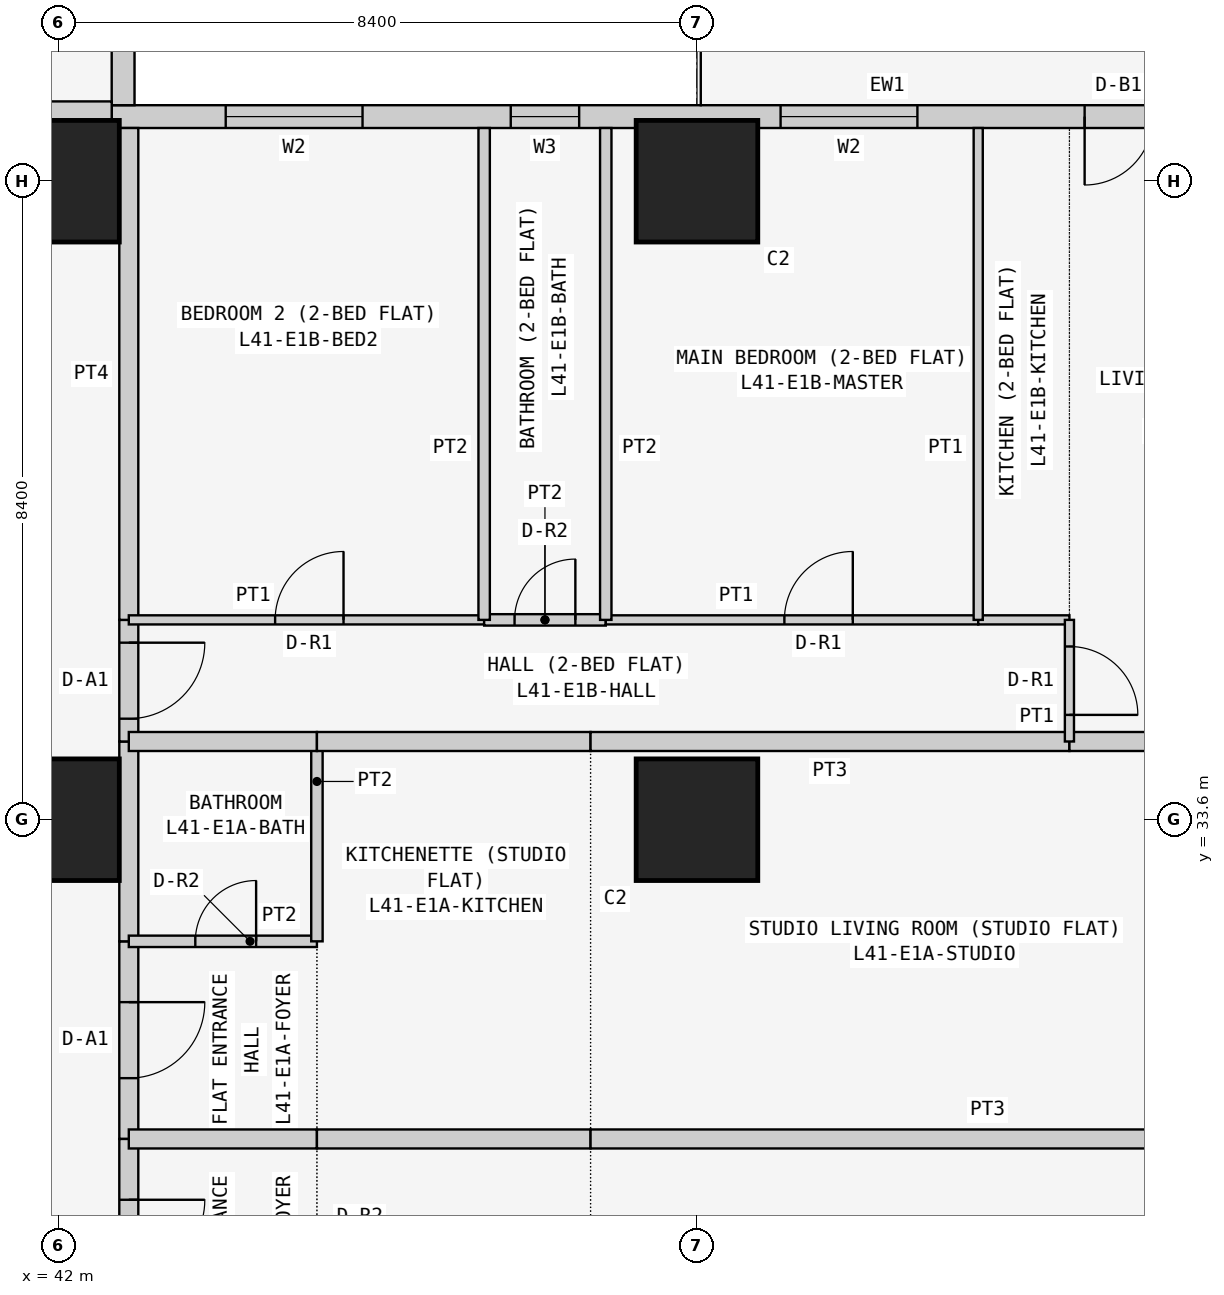
"""IFC4 building model, lengths in metres.
Left out: names, types, materials, properties, quantities, classifications, styles, units other than length and angle.
Written with IfcOpenShell. Run it as: python <this file> out.ifc"""

import sys

from ifc_helpers import new_model, si_unit, direction, frame, frame_2d, origin, origin_2d, place, context, subcontext, project, spatial, rectangle, extrude, element, fill, save


model = new_model("IFC4")
c1 = context("Model", 3, precision=1e-05, world=origin(), true_north=direction((0.0, 1.0)))
c2 = subcontext(c1, "Body", "Model", "MODEL_VIEW")
j1 = project(units=[si_unit("LENGTHUNIT", "METRE"), si_unit("PLANEANGLEUNIT", "RADIAN")], contexts=[c1])
p1 = place(None, origin())
s1 = spatial("IfcSite", under=j1, at=p1, CompositionType="ELEMENT")
p2 = place(p1, origin())
s2 = spatial("IfcBuilding", under=s1, at=p2, CompositionType="ELEMENT")
p3 = place(p2, frame((0.0, 0.0, 159.3)))
s3 = spatial("IfcBuildingStorey", under=s2, at=p3, CompositionType="ELEMENT", Elevation=159.3)
for number, where, z_axis, x_axis in (
    (1, (42.0, 33.6, 0.0), (0.0, 0.0, 1.0), (1.0, 0.0, 0.0)),
    (2, (42.0, 42.0, 0.0), (0.0, 0.0, 1.0), (1.0, 0.0, 0.0)),
    (3, (50.4, 33.6, 0.0), (0.0, 0.0, 1.0), (1.0, 0.0, 0.0)),
    (4, (50.4, 42.0, 0.0), (0.0, 0.0, 1.0), (1.0, 0.0, 0.0)),
):
    element("IfcColumn", number, at=place(p3, frame(where, z_axis=z_axis, x_axis=x_axis)), inside=s3, PredefinedType="COLUMN", context=c2, shape_type="SweptSolid", body=[
        extrude(rectangle(XDim=1.6, YDim=1.6, at=origin_2d()), origin(), (0.0, 0.0, 1.0), 3.6),
    ])
p4 = place(p3, frame((58.4, 42.85, 0.0), z_axis=(0.0, 0.0, 1.0), x_axis=(-1.0, 0.0, 0.0)))
e5 = element("IfcWall", 5, at=p4, inside=s3, PredefinedType="SOLIDWALL", context=c2, shape_type="SweptSolid", body=[
    extrude(rectangle(XDim=15.7, YDim=0.3, at=frame_2d((7.85, 0.0))), origin(), (0.0, 0.0, 1.0), 3.45),
])
p5 = place(p4, frame((12.4, 0.0, 0.9)))
e6 = element("IfcOpeningElement", 6, at=p5, cuts=e5, PredefinedType="OPENING", context=c2, shape_type="SweptSolid", body=[
    extrude(rectangle(XDim=1.8, YDim=1.5, at=frame_2d((0.9, 0.75))), frame((0.0, 0.16, 0.0), z_axis=(0.0, -1.0, 0.0), x_axis=(1.0, 0.0, 0.0)), (0.0, 0.0, 1.0), 0.32),
])
p6 = place(p4, frame((9.55, 0.0, 1.5)))
e7 = element("IfcOpeningElement", 7, at=p6, cuts=e5, PredefinedType="OPENING", context=c2, shape_type="SweptSolid", body=[
    extrude(rectangle(XDim=0.9, YDim=0.7, at=frame_2d((0.45, 0.35))), frame((0.0, 0.16, 0.0), z_axis=(0.0, -1.0, 0.0), x_axis=(1.0, 0.0, 0.0)), (0.0, 0.0, 1.0), 0.32),
])
p7 = place(p4, frame((5.1, 0.0, 0.9)))
e8 = element("IfcOpeningElement", 8, at=p7, cuts=e5, PredefinedType="OPENING", context=c2, shape_type="SweptSolid", body=[
    extrude(rectangle(XDim=1.8, YDim=1.5, at=frame_2d((0.9, 0.75))), frame((0.0, 0.16, 0.0), z_axis=(0.0, -1.0, 0.0), x_axis=(1.0, 0.0, 0.0)), (0.0, 0.0, 1.0), 0.32),
])
p8 = place(p4, frame((2.0, 0.0, 0.0)))
e9 = element("IfcOpeningElement", 9, at=p8, cuts=e5, PredefinedType="OPENING", context=c2, shape_type="SweptSolid", body=[
    extrude(rectangle(XDim=0.9, YDim=2.4, at=frame_2d((0.45, 1.2))), frame((0.0, 0.16, 0.0), z_axis=(0.0, -1.0, 0.0), x_axis=(1.0, 0.0, 0.0)), (0.0, 0.0, 1.0), 0.32),
])
p9 = place(p4, frame((0.7, 0.0, 0.9)))
e10 = element("IfcOpeningElement", 10, at=p9, cuts=e5, PredefinedType="OPENING", context=c2, shape_type="SweptSolid", body=[
    extrude(rectangle(XDim=1.2, YDim=1.5, at=frame_2d((0.6, 0.75))), frame((0.0, 0.16, 0.0), z_axis=(0.0, -1.0, 0.0), x_axis=(1.0, 0.0, 0.0)), (0.0, 0.0, 1.0), 0.32),
])
p10 = place(p3, frame((42.85, 43.0, 0.0), z_axis=(0.0, 0.0, 1.0), x_axis=(0.0, 1.0, 0.0)))
e11 = element("IfcWall", 11, at=p10, inside=s3, PredefinedType="SOLIDWALL", context=c2, shape_type="SweptSolid", body=[
    extrude(rectangle(XDim=7.0, YDim=0.3, at=frame_2d((3.5, 0.0))), origin(), (0.0, 0.0, 1.0), 3.45),
])
p11 = place(p10, frame((1.5, 0.0, 0.9)))
e12 = element("IfcOpeningElement", 12, at=p11, cuts=e11, PredefinedType="OPENING", context=c2, shape_type="SweptSolid", body=[
    extrude(rectangle(XDim=2.4, YDim=1.5, at=frame_2d((1.2, 0.75))), frame((0.0, 0.16, 0.0), z_axis=(0.0, -1.0, 0.0), x_axis=(1.0, 0.0, 0.0)), (0.0, 0.0, 1.0), 0.32),
])
p12 = place(p10, frame((5.05, 0.0, 0.9)))
e13 = element("IfcOpeningElement", 13, at=p12, cuts=e11, PredefinedType="OPENING", context=c2, shape_type="SweptSolid", body=[
    extrude(rectangle(XDim=1.2, YDim=1.5, at=frame_2d((0.6, 0.75))), frame((0.0, 0.16, 0.0), z_axis=(0.0, -1.0, 0.0), x_axis=(1.0, 0.0, 0.0)), (0.0, 0.0, 1.0), 0.32),
])
p13 = place(p3, frame((35.829, 42.925, 0.0), z_axis=(0.0, 0.0, 1.0), x_axis=(1.0, 0.0, 0.0)))
e14 = element("IfcWall", 14, at=p13, inside=s3, PredefinedType="PARTITIONING", context=c2, shape_type="SweptSolid", body=[
    extrude(rectangle(XDim=6.871, YDim=0.25, at=frame_2d((3.436, 0.0))), origin(), (0.0, 0.0, 1.0), 3.45),
])
p14 = place(p3, frame((42.925, 32.0, 0.0), z_axis=(0.0, 0.0, 1.0), x_axis=(0.0, -1.0, 0.0)))
e15 = element("IfcWall", 15, at=p14, inside=s3, PredefinedType="PARTITIONING", context=c2, shape_type="SweptSolid", body=[
    extrude(rectangle(XDim=2.6, YDim=0.25, at=frame_2d((1.3, 0.0))), origin(), (0.0, 0.0, 1.0), 3.45),
])
p15 = place(p14, frame((0.8, 0.0, 0.0)))
e16 = element("IfcOpeningElement", 16, at=p15, cuts=e15, PredefinedType="OPENING", context=c2, shape_type="SweptSolid", body=[
    extrude(rectangle(XDim=1.0, YDim=2.1, at=frame_2d((0.5, 1.05))), frame((0.0, 0.135, 0.0), z_axis=(0.0, -1.0, 0.0), x_axis=(1.0, 0.0, 0.0)), (0.0, 0.0, 1.0), 0.27),
])
p16 = place(p3, frame((42.925, 34.629, 0.0), z_axis=(0.0, 0.0, 1.0), x_axis=(0.0, -1.0, 0.0)))
e17 = element("IfcWall", 17, at=p16, inside=s3, PredefinedType="PARTITIONING", context=c2, shape_type="SweptSolid", body=[
    extrude(rectangle(XDim=2.629, YDim=0.25, at=frame_2d((1.314, 0.0))), origin(), (0.0, 0.0, 1.0), 3.45),
])
p17 = place(p3, frame((42.925, 36.229, 0.0), z_axis=(0.0, 0.0, 1.0), x_axis=(0.0, -1.0, 0.0)))
e18 = element("IfcWall", 18, at=p17, inside=s3, PredefinedType="PARTITIONING", context=c2, shape_type="SweptSolid", body=[
    extrude(rectangle(XDim=1.6, YDim=0.25, at=frame_2d((0.8, 0.0))), origin(), (0.0, 0.0, 1.0), 3.45),
])
p18 = place(p17, frame((0.3, 0.0, 0.0)))
e19 = element("IfcOpeningElement", 19, at=p18, cuts=e18, PredefinedType="OPENING", context=c2, shape_type="SweptSolid", body=[
    extrude(rectangle(XDim=1.0, YDim=2.1, at=frame_2d((0.5, 1.05))), frame((0.0, 0.135, 0.0), z_axis=(0.0, -1.0, 0.0), x_axis=(1.0, 0.0, 0.0)), (0.0, 0.0, 1.0), 0.27),
])
p19 = place(p3, frame((42.925, 42.7, 0.0), z_axis=(0.0, 0.0, 1.0), x_axis=(0.0, -1.0, 0.0)))
e20 = element("IfcWall", 20, at=p19, inside=s3, PredefinedType="PARTITIONING", context=c2, shape_type="SweptSolid", body=[
    extrude(rectangle(XDim=6.471, YDim=0.25, at=frame_2d((3.235, 0.0))), origin(), (0.0, 0.0, 1.0), 3.45),
])
p20 = place(p3, frame((42.925, 29.4, 0.0), z_axis=(0.0, 0.0, 1.0), x_axis=(0.0, -1.0, 0.0)))
e21 = element("IfcWall", 21, at=p20, inside=s3, PredefinedType="PARTITIONING", context=c2, shape_type="SweptSolid", body=[
    extrude(rectangle(XDim=2.6, YDim=0.25, at=frame_2d((1.3, 0.0))), origin(), (0.0, 0.0, 1.0), 3.45),
])
p21 = place(p20, frame((0.8, 0.0, 0.0)))
e22 = element("IfcOpeningElement", 22, at=p21, cuts=e21, PredefinedType="OPENING", context=c2, shape_type="SweptSolid", body=[
    extrude(rectangle(XDim=1.0, YDim=2.1, at=frame_2d((0.5, 1.05))), frame((0.0, 0.135, 0.0), z_axis=(0.0, -1.0, 0.0), x_axis=(1.0, 0.0, 0.0)), (0.0, 0.0, 1.0), 0.27),
])
p22 = place(p3, frame((45.4, 32.0, 0.0), z_axis=(0.0, 0.0, 1.0), x_axis=(-1.0, 0.0, 0.0)))
e23 = element("IfcWall", 23, at=p22, inside=s3, PredefinedType="PARTITIONING", context=c2, shape_type="SweptSolid", body=[
    extrude(rectangle(XDim=2.475, YDim=0.15, at=frame_2d((1.237, 0.0))), origin(), (0.0, 0.0, 1.0), 3.45),
])
p23 = place(p22, frame((0.8, 0.0, 0.0)))
e24 = element("IfcOpeningElement", 24, at=p23, cuts=e23, PredefinedType="OPENING", context=c2, shape_type="SweptSolid", body=[
    extrude(rectangle(XDim=0.8, YDim=2.1, at=frame_2d((0.4, 1.05))), frame((0.0, 0.085, 0.0), z_axis=(0.0, -1.0, 0.0), x_axis=(1.0, 0.0, 0.0)), (0.0, 0.0, 1.0), 0.17),
])
p24 = place(p3, frame((42.925, 29.4, 0.0), z_axis=(0.0, 0.0, 1.0), x_axis=(1.0, 0.0, 0.0)))
e25 = element("IfcWall", 25, at=p24, inside=s3, PredefinedType="PARTITIONING", context=c2, shape_type="SweptSolid", body=[
    extrude(rectangle(XDim=2.475, YDim=0.25, at=frame_2d((1.237, 0.0))), origin(), (0.0, 0.0, 1.0), 3.45),
])
p25 = place(p3, frame((45.4, 32.0, 0.0), z_axis=(0.0, 0.0, 1.0), x_axis=(0.0, 1.0, 0.0)))
e26 = element("IfcWall", 26, at=p25, inside=s3, PredefinedType="PARTITIONING", context=c2, shape_type="SweptSolid", body=[
    extrude(rectangle(XDim=2.629, YDim=0.15, at=frame_2d((1.314, 0.0))), origin(), (0.0, 0.0, 1.0), 3.45),
])
p26 = place(p3, frame((45.4, 34.629, 0.0), z_axis=(0.0, 0.0, 1.0), x_axis=(-1.0, 0.0, 0.0)))
e27 = element("IfcWall", 27, at=p26, inside=s3, PredefinedType="PARTITIONING", context=c2, shape_type="SweptSolid", body=[
    extrude(rectangle(XDim=2.475, YDim=0.25, at=frame_2d((1.237, 0.0))), origin(), (0.0, 0.0, 1.0), 3.45),
])
for number, where, z_axis, x_axis in (
    (28, (49.0, 34.629, 0.0), (0.0, 0.0, 1.0), (-1.0, 0.0, 0.0)),
    (29, (45.4, 29.4, 0.0), (0.0, 0.0, 1.0), (1.0, 0.0, 0.0)),
):
    element("IfcWall", number, at=place(p3, frame(where, z_axis=z_axis, x_axis=x_axis)), inside=s3, PredefinedType="PARTITIONING", context=c2, shape_type="SweptSolid", body=[
        extrude(rectangle(XDim=3.6, YDim=0.25, at=frame_2d((1.8, 0.0))), origin(), (0.0, 0.0, 1.0), 3.45),
    ])
p27 = place(p3, frame((55.3, 34.629, 0.0), z_axis=(0.0, 0.0, 1.0), x_axis=(-1.0, 0.0, 0.0)))
e30 = element("IfcWall", 30, at=p27, inside=s3, PredefinedType="PARTITIONING", context=c2, shape_type="SweptSolid", body=[
    extrude(rectangle(XDim=6.3, YDim=0.25, at=frame_2d((3.15, 0.0))), origin(), (0.0, 0.0, 1.0), 3.45),
])
p28 = place(p3, frame((59.45, 34.629, 0.0), z_axis=(0.0, 0.0, 1.0), x_axis=(-1.0, 0.0, 0.0)))
e31 = element("IfcWall", 31, at=p28, inside=s3, PredefinedType="PARTITIONING", context=c2, shape_type="SweptSolid", body=[
    extrude(rectangle(XDim=4.15, YDim=0.25, at=frame_2d((2.075, 0.0))), origin(), (0.0, 0.0, 1.0), 3.45),
])
p29 = place(p3, frame((49.0, 29.4, 0.0), z_axis=(0.0, 0.0, 1.0), x_axis=(1.0, 0.0, 0.0)))
e32 = element("IfcWall", 32, at=p29, inside=s3, PredefinedType="PARTITIONING", context=c2, shape_type="SweptSolid", body=[
    extrude(rectangle(XDim=10.45, YDim=0.25, at=frame_2d((5.225, 0.0))), origin(), (0.0, 0.0, 1.0), 3.45),
])
p30 = place(p3, frame((47.6, 36.229, 0.0), z_axis=(0.0, 0.0, 1.0), x_axis=(-1.0, 0.0, 0.0)))
e33 = element("IfcWall", 33, at=p30, inside=s3, PredefinedType="PARTITIONING", context=c2, shape_type="SweptSolid", body=[
    extrude(rectangle(XDim=4.675, YDim=0.12, at=frame_2d((2.337, 0.0))), origin(), (0.0, 0.0, 1.0), 3.45),
])
p31 = place(p30, frame((1.85, 0.0, 0.0)))
e34 = element("IfcOpeningElement", 34, at=p31, cuts=e33, PredefinedType="OPENING", context=c2, shape_type="SweptSolid", body=[
    extrude(rectangle(XDim=0.9, YDim=2.1, at=frame_2d((0.45, 1.05))), frame((0.0, 0.07, 0.0), z_axis=(0.0, -1.0, 0.0), x_axis=(1.0, 0.0, 0.0)), (0.0, 0.0, 1.0), 0.14),
])
p32 = place(p3, frame((49.2, 36.229, 0.0), z_axis=(0.0, 0.0, 1.0), x_axis=(-1.0, 0.0, 0.0)))
e35 = element("IfcWall", 35, at=p32, inside=s3, PredefinedType="PARTITIONING", context=c2, shape_type="SweptSolid", body=[
    extrude(rectangle(XDim=1.6, YDim=0.15, at=frame_2d((0.8, 0.0))), origin(), (0.0, 0.0, 1.0), 3.45),
])
p33 = place(p32, frame((0.4, 0.0, 0.0)))
e36 = element("IfcOpeningElement", 36, at=p33, cuts=e35, PredefinedType="OPENING", context=c2, shape_type="SweptSolid", body=[
    extrude(rectangle(XDim=0.8, YDim=2.1, at=frame_2d((0.4, 1.05))), frame((0.0, 0.085, 0.0), z_axis=(0.0, -1.0, 0.0), x_axis=(1.0, 0.0, 0.0)), (0.0, 0.0, 1.0), 0.17),
])
p34 = place(p3, frame((54.1, 36.229, 0.0), z_axis=(0.0, 0.0, 1.0), x_axis=(-1.0, 0.0, 0.0)))
e37 = element("IfcWall", 37, at=p34, inside=s3, PredefinedType="PARTITIONING", context=c2, shape_type="SweptSolid", body=[
    extrude(rectangle(XDim=4.9, YDim=0.12, at=frame_2d((2.45, 0.0))), origin(), (0.0, 0.0, 1.0), 3.45),
])
p35 = place(p34, frame((1.65, 0.0, 0.0)))
e38 = element("IfcOpeningElement", 38, at=p35, cuts=e37, PredefinedType="OPENING", context=c2, shape_type="SweptSolid", body=[
    extrude(rectangle(XDim=0.9, YDim=2.1, at=frame_2d((0.45, 1.05))), frame((0.0, 0.07, 0.0), z_axis=(0.0, -1.0, 0.0), x_axis=(1.0, 0.0, 0.0)), (0.0, 0.0, 1.0), 0.14),
])
p36 = place(p3, frame((55.3, 36.229, 0.0), z_axis=(0.0, 0.0, 1.0), x_axis=(-1.0, 0.0, 0.0)))
e39 = element("IfcWall", 39, at=p36, inside=s3, PredefinedType="PARTITIONING", context=c2, shape_type="SweptSolid", body=[
    extrude(rectangle(XDim=1.2, YDim=0.12, at=frame_2d((0.6, 0.0))), origin(), (0.0, 0.0, 1.0), 3.45),
])
p37 = place(p3, frame((55.3, 34.629, 0.0), z_axis=(0.0, 0.0, 1.0), x_axis=(0.0, 1.0, 0.0)))
e40 = element("IfcWall", 40, at=p37, inside=s3, PredefinedType="PARTITIONING", context=c2, shape_type="SweptSolid", body=[
    extrude(rectangle(XDim=1.6, YDim=0.12, at=frame_2d((0.8, 0.0))), origin(), (0.0, 0.0, 1.0), 3.45),
])
p38 = place(p37, frame((0.35, 0.0, 0.0)))
e41 = element("IfcOpeningElement", 41, at=p38, cuts=e40, PredefinedType="OPENING", context=c2, shape_type="SweptSolid", body=[
    extrude(rectangle(XDim=0.9, YDim=2.1, at=frame_2d((0.45, 1.05))), frame((0.0, 0.07, 0.0), z_axis=(0.0, -1.0, 0.0), x_axis=(1.0, 0.0, 0.0)), (0.0, 0.0, 1.0), 0.14),
])
for number, where, z_axis, x_axis in (
    (42, (47.6, 36.229, 0.0), (0.0, 0.0, 1.0), (0.0, 1.0, 0.0)),
    (43, (49.2, 36.229, 0.0), (0.0, 0.0, 1.0), (0.0, 1.0, 0.0)),
):
    element("IfcWall", number, at=place(p3, frame(where, z_axis=z_axis, x_axis=x_axis)), inside=s3, PredefinedType="PARTITIONING", context=c2, shape_type="SweptSolid", body=[
        extrude(rectangle(XDim=6.471, YDim=0.15, at=frame_2d((3.235, 0.0))), origin(), (0.0, 0.0, 1.0), 3.45),
    ])
p39 = place(p3, frame((54.1, 36.229, 0.0), z_axis=(0.0, 0.0, 1.0), x_axis=(0.0, 1.0, 0.0)))
e44 = element("IfcWall", 44, at=p39, inside=s3, PredefinedType="PARTITIONING", context=c2, shape_type="SweptSolid", body=[
    extrude(rectangle(XDim=6.471, YDim=0.12, at=frame_2d((3.235, 0.0))), origin(), (0.0, 0.0, 1.0), 3.45),
])
p40 = place(p5, origin())
e45 = element("IfcWindow", 45, at=p40, inside=s3, PartitioningType="SINGLE_PANEL", PredefinedType="WINDOW", context=c2, shape_type="SweptSolid", body=[
    extrude(rectangle(XDim=1.8, YDim=1.5, at=frame_2d((0.9, 0.75))), frame((0.0, 0.03, 0.0), z_axis=(0.0, -1.0, 0.0), x_axis=(1.0, 0.0, 0.0)), (0.0, 0.0, 1.0), 0.06),
])
fill(e6, e45)
p41 = place(p6, origin())
e46 = element("IfcWindow", 46, at=p41, inside=s3, PartitioningType="SINGLE_PANEL", PredefinedType="WINDOW", context=c2, shape_type="SweptSolid", body=[
    extrude(rectangle(XDim=0.9, YDim=0.7, at=frame_2d((0.45, 0.35))), frame((0.0, 0.03, 0.0), z_axis=(0.0, -1.0, 0.0), x_axis=(1.0, 0.0, 0.0)), (0.0, 0.0, 1.0), 0.06),
])
fill(e7, e46)
p42 = place(p7, origin())
e47 = element("IfcWindow", 47, at=p42, inside=s3, PartitioningType="SINGLE_PANEL", PredefinedType="WINDOW", context=c2, shape_type="SweptSolid", body=[
    extrude(rectangle(XDim=1.8, YDim=1.5, at=frame_2d((0.9, 0.75))), frame((0.0, 0.03, 0.0), z_axis=(0.0, -1.0, 0.0), x_axis=(1.0, 0.0, 0.0)), (0.0, 0.0, 1.0), 0.06),
])
fill(e8, e47)
p43 = place(p8, origin())
e48 = element("IfcDoor", 48, at=p43, inside=s3, OperationType="SINGLE_SWING_RIGHT", PredefinedType="DOOR", context=c2, shape_type="SweptSolid", body=[
    extrude(rectangle(XDim=0.9, YDim=2.4, at=frame_2d((0.45, 1.2))), frame((0.0, 0.025, 0.0), z_axis=(0.0, -1.0, 0.0), x_axis=(1.0, 0.0, 0.0)), (0.0, 0.0, 1.0), 0.05),
])
fill(e9, e48)
p44 = place(p15, origin())
e49 = element("IfcDoor", 49, at=p44, inside=s3, OperationType="SINGLE_SWING_LEFT", PredefinedType="DOOR", context=c2, shape_type="SweptSolid", body=[
    extrude(rectangle(XDim=1.0, YDim=2.1, at=frame_2d((0.5, 1.05))), frame((0.0, 0.025, 0.0), z_axis=(0.0, -1.0, 0.0), x_axis=(1.0, 0.0, 0.0)), (0.0, 0.0, 1.0), 0.05),
])
fill(e16, e49)
p45 = place(p23, frame((0.8, 0.0, 0.0), z_axis=(0.0, 0.0, 1.0), x_axis=(-1.0, 0.0, 0.0)))
e50 = element("IfcDoor", 50, at=p45, inside=s3, OperationType="SINGLE_SWING_RIGHT", PredefinedType="DOOR", context=c2, shape_type="SweptSolid", body=[
    extrude(rectangle(XDim=0.8, YDim=2.1, at=frame_2d((0.4, 1.05))), frame((0.0, 0.025, 0.0), z_axis=(0.0, -1.0, 0.0), x_axis=(1.0, 0.0, 0.0)), (0.0, 0.0, 1.0), 0.05),
])
fill(e24, e50)
p46 = place(p18, origin())
e51 = element("IfcDoor", 51, at=p46, inside=s3, OperationType="SINGLE_SWING_LEFT", PredefinedType="DOOR", context=c2, shape_type="SweptSolid", body=[
    extrude(rectangle(XDim=1.0, YDim=2.1, at=frame_2d((0.5, 1.05))), frame((0.0, 0.025, 0.0), z_axis=(0.0, -1.0, 0.0), x_axis=(1.0, 0.0, 0.0)), (0.0, 0.0, 1.0), 0.05),
])
fill(e19, e51)
p47 = place(p31, frame((0.9, 0.0, 0.0), z_axis=(0.0, 0.0, 1.0), x_axis=(-1.0, 0.0, 0.0)))
e52 = element("IfcDoor", 52, at=p47, inside=s3, OperationType="SINGLE_SWING_RIGHT", PredefinedType="DOOR", context=c2, shape_type="SweptSolid", body=[
    extrude(rectangle(XDim=0.9, YDim=2.1, at=frame_2d((0.45, 1.05))), frame((0.0, 0.025, 0.0), z_axis=(0.0, -1.0, 0.0), x_axis=(1.0, 0.0, 0.0)), (0.0, 0.0, 1.0), 0.05),
])
fill(e34, e52)
p48 = place(p33, frame((0.8, 0.0, 0.0), z_axis=(0.0, 0.0, 1.0), x_axis=(-1.0, 0.0, 0.0)))
e53 = element("IfcDoor", 53, at=p48, inside=s3, OperationType="SINGLE_SWING_RIGHT", PredefinedType="DOOR", context=c2, shape_type="SweptSolid", body=[
    extrude(rectangle(XDim=0.8, YDim=2.1, at=frame_2d((0.4, 1.05))), frame((0.0, 0.025, 0.0), z_axis=(0.0, -1.0, 0.0), x_axis=(1.0, 0.0, 0.0)), (0.0, 0.0, 1.0), 0.05),
])
fill(e36, e53)
p49 = place(p35, frame((0.9, 0.0, 0.0), z_axis=(0.0, 0.0, 1.0), x_axis=(-1.0, 0.0, 0.0)))
e54 = element("IfcDoor", 54, at=p49, inside=s3, OperationType="SINGLE_SWING_RIGHT", PredefinedType="DOOR", context=c2, shape_type="SweptSolid", body=[
    extrude(rectangle(XDim=0.9, YDim=2.1, at=frame_2d((0.45, 1.05))), frame((0.0, 0.025, 0.0), z_axis=(0.0, -1.0, 0.0), x_axis=(1.0, 0.0, 0.0)), (0.0, 0.0, 1.0), 0.05),
])
fill(e38, e54)
p50 = place(p38, frame((0.9, 0.0, 0.0), z_axis=(0.0, 0.0, 1.0), x_axis=(-1.0, 0.0, 0.0)))
e55 = element("IfcDoor", 55, at=p50, inside=s3, OperationType="SINGLE_SWING_RIGHT", PredefinedType="DOOR", context=c2, shape_type="SweptSolid", body=[
    extrude(rectangle(XDim=0.9, YDim=2.1, at=frame_2d((0.45, 1.05))), frame((0.0, 0.025, 0.0), z_axis=(0.0, -1.0, 0.0), x_axis=(1.0, 0.0, 0.0)), (0.0, 0.0, 1.0), 0.05),
])
fill(e41, e55)
p51 = place(p21, origin())
e56 = element("IfcDoor", 56, at=p51, inside=s3, OperationType="SINGLE_SWING_LEFT", PredefinedType="DOOR", context=c2, shape_type="SweptSolid", body=[
    extrude(rectangle(XDim=1.0, YDim=2.1, at=frame_2d((0.5, 1.05))), frame((0.0, 0.025, 0.0), z_axis=(0.0, -1.0, 0.0), x_axis=(1.0, 0.0, 0.0)), (0.0, 0.0, 1.0), 0.05),
])
fill(e22, e56)
save(model, sys.argv[1])
